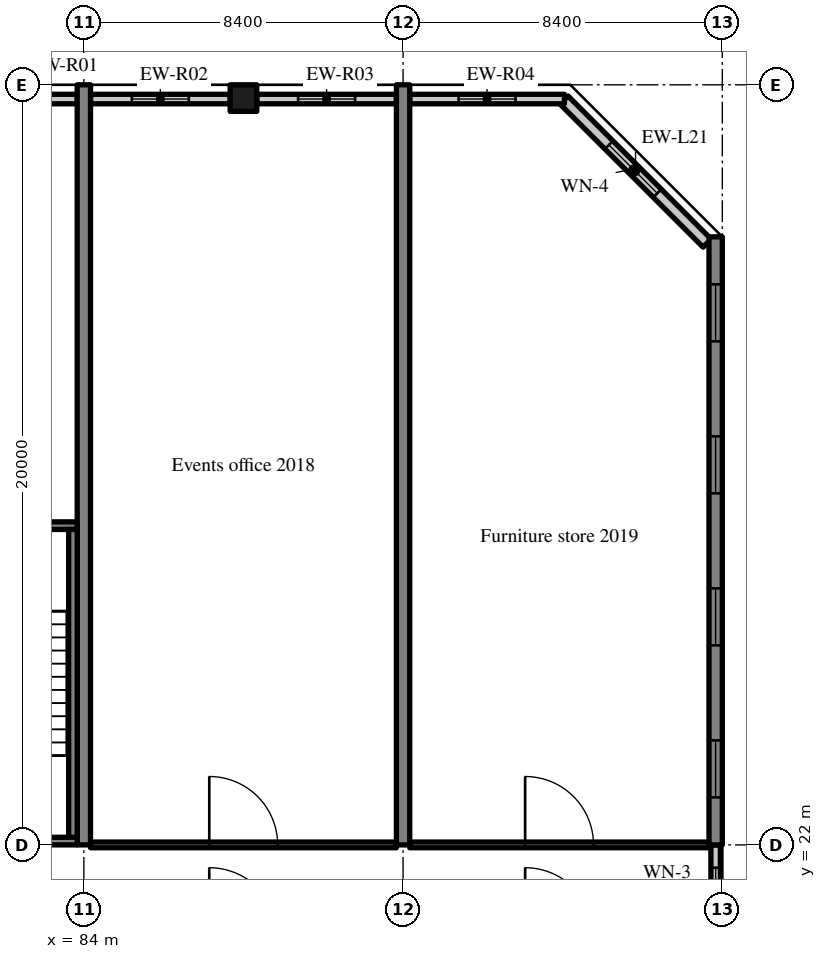
"""IFC4 building model, lengths in metres.
Left out: names, types, materials, properties, quantities, classifications, styles, units other than length and angle.
Written with IfcOpenShell. Run it as: python <this file> out.ifc"""

import sys

from ifc_helpers import new_model, si_unit, direction, frame, frame_2d, origin, origin_2d, place, context, subcontext, project, spatial, rectangle, extrude, source, transform, mapped, element, fill, save


model = new_model("IFC4")
c1 = context("Model", 3, precision=1e-05, world=origin(), true_north=direction((0.0, 1.0)))
c2 = subcontext(c1, "Body", "Model", "MODEL_VIEW")
j1 = project(units=[si_unit("LENGTHUNIT", "METRE"), si_unit("PLANEANGLEUNIT", "RADIAN")], contexts=[c1])
p1 = place(None, origin())
s1 = spatial("IfcSite", under=j1, at=p1, CompositionType="ELEMENT")
p2 = place(p1, origin())
s2 = spatial("IfcBuilding", under=s1, at=p2, CompositionType="ELEMENT")
p3 = place(p2, frame((0.0, 0.0, 86.4)))
s3 = spatial("IfcBuildingStorey", under=s2, at=p3, CompositionType="ELEMENT", Elevation=86.4)
m1 = source(origin(), c2, "Body", "SweptSolid", [
    extrude(rectangle(XDim=20.0, YDim=0.35, at=frame_2d((10.0, 0.0))), origin(), (0.0, 0.0, 1.0), 4.72),
])
for number, where, z_axis, x_axis in (
    (1, (84.0, 22.0, 0.0), (0.0, 0.0, 1.0), (0.0, 1.0, 0.0)),
    (2, (92.4, 22.0, 0.0), (0.0, 0.0, 1.0), (0.0, 1.0, 0.0)),
):
    element("IfcWall", number, at=place(p3, frame(where, z_axis=z_axis, x_axis=x_axis)), inside=s3, PredefinedType="SHEAR", context=c2, shape_type="MappedRepresentation", body=[
        mapped(m1, transform((0.0, 0.0, 0.0), scale=1.0)),
    ])
m2 = source(origin(), c2, "Body", "SweptSolid", [
    extrude(rectangle(XDim=16.0, YDim=0.35, at=frame_2d((8.0, 0.0))), origin(), (0.0, 0.0, 1.0), 4.72),
])
p4 = place(p3, frame((100.625, 22.0, 0.0), z_axis=(0.0, 0.0, 1.0), x_axis=(0.0, 1.0, 0.0)))
e3 = element("IfcWall", 3, at=p4, inside=s3, PredefinedType="SHEAR", context=c2, shape_type="MappedRepresentation", body=[
    mapped(m2, transform((0.0, 0.0, 0.0), scale=1.0)),
])
m3 = source(origin(), c2, "Body", "SweptSolid", [
    extrude(rectangle(XDim=1.5, YDim=1.5, at=frame_2d((0.75, 0.75))), frame((0.0, 0.185, 0.0), z_axis=(0.0, -1.0, 0.0), x_axis=(1.0, 0.0, 0.0)), (0.0, 0.0, 1.0), 0.37),
])
p5 = place(p4, frame((1.25, 0.0, 0.9)))
e4 = element("IfcOpeningElement", 4, at=p5, cuts=e3, PredefinedType="OPENING", context=c2, shape_type="MappedRepresentation", body=[
    mapped(m3, transform((0.0, 0.0, 0.0), scale=1.0)),
])
p6 = place(p4, frame((5.25, 0.0, 0.9)))
e5 = element("IfcOpeningElement", 5, at=p6, cuts=e3, PredefinedType="OPENING", context=c2, shape_type="MappedRepresentation", body=[
    mapped(m3, transform((0.0, 0.0, 0.0), scale=1.0)),
])
p7 = place(p4, frame((9.25, 0.0, 0.9)))
e6 = element("IfcOpeningElement", 6, at=p7, cuts=e3, PredefinedType="OPENING", context=c2, shape_type="MappedRepresentation", body=[
    mapped(m3, transform((0.0, 0.0, 0.0), scale=1.0)),
])
p8 = place(p4, frame((13.25, 0.0, 0.9)))
e7 = element("IfcOpeningElement", 7, at=p8, cuts=e3, PredefinedType="OPENING", context=c2, shape_type="MappedRepresentation", body=[
    mapped(m3, transform((0.0, 0.0, 0.0), scale=1.0)),
])
m4 = source(origin(), c2, "Body", "SweptSolid", [
    extrude(rectangle(XDim=0.7, YDim=0.7, at=origin_2d()), origin(), (0.0, 0.0, 1.0), 4.72),
])
p9 = place(p3, frame((88.2, 41.65, 0.0), z_axis=(0.0, 0.0, 1.0), x_axis=(1.0, 0.0, 0.0)))
e8 = element("IfcColumn", 8, at=p9, inside=s3, PredefinedType="COLUMN", context=c2, shape_type="MappedRepresentation", body=[
    mapped(m4, transform((0.0, 0.0, 0.0), scale=1.0)),
])
m5 = source(origin(), c2, "Body", "SweptSolid", [
    extrude(rectangle(XDim=5.326, YDim=0.3, at=frame_2d((2.663, 0.0))), origin(), (0.0, 0.0, 1.0), 4.72),
])
p10 = place(p3, frame((100.4, 37.834, 0.0), z_axis=(0.0, 0.0, 1.0), x_axis=(-0.707083859269, 0.707129702361, 0.0)))
e9 = element("IfcWall", 9, at=p10, inside=s3, PredefinedType="SOLIDWALL", context=c2, shape_type="MappedRepresentation", body=[
    mapped(m5, transform((0.0, 0.0, 0.0), scale=1.0)),
])
m6 = source(origin(), c2, "Body", "SweptSolid", [
    extrude(rectangle(XDim=1.8, YDim=1.5, at=frame_2d((0.9, 0.75))), frame((0.0, 0.16, 0.0), z_axis=(0.0, -1.0, 0.0), x_axis=(1.0, 0.0, 0.0)), (0.0, 0.0, 1.0), 0.32),
])
p11 = place(p10, frame((1.854, 0.0, 0.9)))
e10 = element("IfcOpeningElement", 10, at=p11, cuts=e9, PredefinedType="OPENING", context=c2, shape_type="MappedRepresentation", body=[
    mapped(m6, transform((0.0, 0.0, 0.0), scale=1.0)),
])
m7 = source(origin(), c2, "Body", "SweptSolid", [
    extrude(rectangle(XDim=1.683, YDim=0.25, at=frame_2d((0.841, 0.0))), origin(), (0.0, 0.0, 1.0), 4.02),
])
p12 = place(p3, frame((83.825, 41.625, 0.0), z_axis=(0.0, 0.0, 1.0), x_axis=(-1.0, 0.0, 0.0)))
e11 = element("IfcWall", 11, at=p12, inside=s3, PredefinedType="SOLIDWALL", context=c2, shape_type="MappedRepresentation", body=[
    mapped(m7, transform((0.0, 0.0, 0.0), scale=1.0)),
])
m8 = source(origin(), c2, "Body", "SweptSolid", [
    extrude(rectangle(XDim=3.675, YDim=0.25, at=frame_2d((1.837, 0.0))), origin(), (0.0, 0.0, 1.0), 4.02),
])
p13 = place(p3, frame((87.85, 41.625, 0.0), z_axis=(0.0, 0.0, 1.0), x_axis=(-1.0, 0.0, 0.0)))
e12 = element("IfcWall", 12, at=p13, inside=s3, PredefinedType="SOLIDWALL", context=c2, shape_type="MappedRepresentation", body=[
    mapped(m8, transform((0.0, 0.0, 0.0), scale=1.0)),
])
m9 = source(origin(), c2, "Body", "SweptSolid", [
    extrude(rectangle(XDim=1.5, YDim=1.5, at=frame_2d((0.75, 0.75))), frame((0.0, 0.135, 0.0), z_axis=(0.0, -1.0, 0.0), x_axis=(1.0, 0.0, 0.0)), (0.0, 0.0, 1.0), 0.27),
])
p14 = place(p13, frame((1.087, 0.0, 0.9)))
e13 = element("IfcOpeningElement", 13, at=p14, cuts=e12, PredefinedType="OPENING", context=c2, shape_type="MappedRepresentation", body=[
    mapped(m9, transform((0.0, 0.0, 0.0), scale=1.0)),
])
p15 = place(p3, frame((92.225, 41.625, 0.0), z_axis=(0.0, 0.0, 1.0), x_axis=(-1.0, 0.0, 0.0)))
e14 = element("IfcWall", 14, at=p15, inside=s3, PredefinedType="SOLIDWALL", context=c2, shape_type="MappedRepresentation", body=[
    mapped(m8, transform((0.0, 0.0, 0.0), scale=1.0)),
])
p16 = place(p15, frame((1.087, 0.0, 0.9)))
e15 = element("IfcOpeningElement", 15, at=p16, cuts=e14, PredefinedType="OPENING", context=c2, shape_type="MappedRepresentation", body=[
    mapped(m9, transform((0.0, 0.0, 0.0), scale=1.0)),
])
m10 = source(origin(), c2, "Body", "SweptSolid", [
    extrude(rectangle(XDim=4.07, YDim=0.25, at=frame_2d((2.035, 0.0))), origin(), (0.0, 0.0, 1.0), 4.02),
])
p17 = place(p3, frame((96.645, 41.625, 0.0), z_axis=(0.0, 0.0, 1.0), x_axis=(-1.0, 0.0, 0.0)))
e16 = element("IfcWall", 16, at=p17, inside=s3, PredefinedType="SOLIDWALL", context=c2, shape_type="MappedRepresentation", body=[
    mapped(m10, transform((0.0, 0.0, 0.0), scale=1.0)),
])
p18 = place(p17, frame((1.285, 0.0, 0.9)))
e17 = element("IfcOpeningElement", 17, at=p18, cuts=e16, PredefinedType="OPENING", context=c2, shape_type="MappedRepresentation", body=[
    mapped(m9, transform((0.0, 0.0, 0.0), scale=1.0)),
])
m11 = source(origin(), c2, "Body", "SweptSolid", [
    extrude(rectangle(XDim=2.4, YDim=0.25, at=frame_2d((1.2, 0.0))), origin(), (0.0, 0.0, 1.0), 3.82),
])
p19 = place(p3, frame((100.625, 19.6, 0.0), z_axis=(0.0, 0.0, 1.0), x_axis=(0.0, 1.0, 0.0)))
e18 = element("IfcWall", 18, at=p19, inside=s3, PredefinedType="SOLIDWALL", context=c2, shape_type="MappedRepresentation", body=[
    mapped(m11, transform((0.0, 0.0, 0.0), scale=1.0)),
])
m12 = source(origin(), c2, "Body", "SweptSolid", [
    extrude(rectangle(XDim=1.2, YDim=1.5, at=frame_2d((0.6, 0.75))), frame((0.0, 0.135, 0.0), z_axis=(0.0, -1.0, 0.0), x_axis=(1.0, 0.0, 0.0)), (0.0, 0.0, 1.0), 0.27),
])
p20 = place(p19, frame((0.6, 0.0, 0.9)))
e19 = element("IfcOpeningElement", 19, at=p20, cuts=e18, PredefinedType="OPENING", context=c2, shape_type="MappedRepresentation", body=[
    mapped(m12, transform((0.0, 0.0, 0.0), scale=1.0)),
])
m13 = source(origin(), c2, "Body", "SweptSolid", [
    extrude(rectangle(XDim=8.225, YDim=0.2, at=frame_2d((4.112, 0.0))), origin(), (0.0, 0.0, 1.0), 4.72),
])
p21 = place(p3, frame((83.825, 22.1, 0.0), z_axis=(0.0, 0.0, 1.0), x_axis=(-1.0, 0.0, 0.0)))
e20 = element("IfcWall", 20, at=p21, inside=s3, PredefinedType="SOLIDWALL", context=c2, shape_type="MappedRepresentation", body=[
    mapped(m13, transform((0.0, 0.0, 0.0), scale=1.0)),
])
m14 = source(origin(), c2, "Body", "SweptSolid", [
    extrude(rectangle(XDim=1.2, YDim=2.1, at=frame_2d((0.6, 1.05))), frame((0.0, 0.11, 0.0), z_axis=(0.0, -1.0, 0.0), x_axis=(1.0, 0.0, 0.0)), (0.0, 0.0, 1.0), 0.22),
])
p22 = place(p21, frame((6.025, 0.0, 0.0)))
e21 = element("IfcOpeningElement", 21, at=p22, cuts=e20, PredefinedType="OPENING", context=c2, shape_type="MappedRepresentation", body=[
    mapped(m14, transform((0.0, 0.0, 0.0), scale=1.0)),
])
p23 = place(p3, frame((83.825, 30.4, 0.0), z_axis=(0.0, 0.0, 1.0), x_axis=(-1.0, 0.0, 0.0)))
e22 = element("IfcWall", 22, at=p23, inside=s3, PredefinedType="SOLIDWALL", context=c2, shape_type="MappedRepresentation", body=[
    mapped(m13, transform((0.0, 0.0, 0.0), scale=1.0)),
])
m15 = source(origin(), c2, "Body", "SweptSolid", [
    extrude(rectangle(XDim=1.0, YDim=2.1, at=frame_2d((0.5, 1.05))), frame((0.0, 0.11, 0.0), z_axis=(0.0, -1.0, 0.0), x_axis=(1.0, 0.0, 0.0)), (0.0, 0.0, 1.0), 0.22),
])
p24 = place(p23, frame((6.125, 0.0, 0.0)))
e23 = element("IfcOpeningElement", 23, at=p24, cuts=e22, PredefinedType="OPENING", context=c2, shape_type="MappedRepresentation", body=[
    mapped(m15, transform((0.0, 0.0, 0.0), scale=1.0)),
])
m16 = source(origin(), c2, "Body", "SweptSolid", [
    extrude(rectangle(XDim=8.1, YDim=0.225, at=frame_2d((4.05, 0.0))), origin(), (0.0, 0.0, 1.0), 4.72),
])
p25 = place(p3, frame((83.713, 22.2, 0.0), z_axis=(0.0, 0.0, 1.0), x_axis=(0.0, 1.0, 0.0)))
e24 = element("IfcWall", 24, at=p25, inside=s3, PredefinedType="SOLIDWALL", context=c2, shape_type="MappedRepresentation", body=[
    mapped(m16, transform((0.0, 0.0, 0.0), scale=1.0)),
])
m17 = source(origin(), c2, "Body", "SweptSolid", [
    extrude(rectangle(XDim=8.05, YDim=0.15, at=frame_2d((4.025, 0.0))), origin(), (0.0, 0.0, 1.0), 4.02),
])
p26 = place(p3, frame((84.175, 22.0, 0.0), z_axis=(0.0, 0.0, 1.0), x_axis=(1.0, 0.0, 0.0)))
e25 = element("IfcWall", 25, at=p26, inside=s3, PredefinedType="PARTITIONING", context=c2, shape_type="MappedRepresentation", body=[
    mapped(m17, transform((0.0, 0.0, 0.0), scale=1.0)),
])
m18 = source(origin(), c2, "Body", "SweptSolid", [
    extrude(rectangle(XDim=1.8, YDim=2.1, at=frame_2d((0.9, 1.05))), frame((0.0, 0.085, 0.0), z_axis=(0.0, -1.0, 0.0), x_axis=(1.0, 0.0, 0.0)), (0.0, 0.0, 1.0), 0.17),
])
p27 = place(p26, frame((3.125, 0.0, 0.0)))
e26 = element("IfcOpeningElement", 26, at=p27, cuts=e25, PredefinedType="OPENING", context=c2, shape_type="MappedRepresentation", body=[
    mapped(m18, transform((0.0, 0.0, 0.0), scale=1.0)),
])
m19 = source(origin(), c2, "Body", "SweptSolid", [
    extrude(rectangle(XDim=7.875, YDim=0.15, at=frame_2d((3.938, 0.0))), origin(), (0.0, 0.0, 1.0), 4.02),
])
p28 = place(p3, frame((92.575, 22.0, 0.0), z_axis=(0.0, 0.0, 1.0), x_axis=(1.0, 0.0, 0.0)))
e27 = element("IfcWall", 27, at=p28, inside=s3, PredefinedType="PARTITIONING", context=c2, shape_type="MappedRepresentation", body=[
    mapped(m19, transform((0.0, 0.0, 0.0), scale=1.0)),
])
p29 = place(p28, frame((3.037, 0.0, 0.0)))
e28 = element("IfcOpeningElement", 28, at=p29, cuts=e27, PredefinedType="OPENING", context=c2, shape_type="MappedRepresentation", body=[
    mapped(m18, transform((0.0, 0.0, 0.0), scale=1.0)),
])
m20 = source(origin(), c2, "Body", "SweptSolid", [
    extrude(rectangle(XDim=1.8, YDim=1.5, at=frame_2d((0.9, 0.75))), frame((0.0, 0.03, 0.0), z_axis=(0.0, -1.0, 0.0), x_axis=(1.0, 0.0, 0.0)), (0.0, 0.0, 1.0), 0.06),
])
p30 = place(p11, origin())
e29 = element("IfcWindow", 29, at=p30, inside=s3, PartitioningType="SINGLE_PANEL", PredefinedType="WINDOW", context=c2, shape_type="MappedRepresentation", body=[
    mapped(m20, transform((0.0, 0.0, 0.0), scale=1.0)),
])
fill(e10, e29)
m21 = source(origin(), c2, "Body", "SweptSolid", [
    extrude(rectangle(XDim=1.5, YDim=1.5, at=frame_2d((0.75, 0.75))), frame((0.0, 0.03, 0.0), z_axis=(0.0, -1.0, 0.0), x_axis=(1.0, 0.0, 0.0)), (0.0, 0.0, 1.0), 0.06),
])
p31 = place(p14, origin())
e30 = element("IfcWindow", 30, at=p31, inside=s3, PartitioningType="SINGLE_PANEL", PredefinedType="WINDOW", context=c2, shape_type="MappedRepresentation", body=[
    mapped(m21, transform((0.0, 0.0, 0.0), scale=1.0)),
])
fill(e13, e30)
p32 = place(p16, origin())
e31 = element("IfcWindow", 31, at=p32, inside=s3, PartitioningType="SINGLE_PANEL", PredefinedType="WINDOW", context=c2, shape_type="MappedRepresentation", body=[
    mapped(m21, transform((0.0, 0.0, 0.0), scale=1.0)),
])
fill(e15, e31)
p33 = place(p18, origin())
e32 = element("IfcWindow", 32, at=p33, inside=s3, PartitioningType="SINGLE_PANEL", PredefinedType="WINDOW", context=c2, shape_type="MappedRepresentation", body=[
    mapped(m21, transform((0.0, 0.0, 0.0), scale=1.0)),
])
fill(e17, e32)
p34 = place(p5, origin())
e33 = element("IfcWindow", 33, at=p34, inside=s3, PartitioningType="SINGLE_PANEL", PredefinedType="WINDOW", context=c2, shape_type="MappedRepresentation", body=[
    mapped(m21, transform((0.0, 0.0, 0.0), scale=1.0)),
])
fill(e4, e33)
p35 = place(p6, origin())
e34 = element("IfcWindow", 34, at=p35, inside=s3, PartitioningType="SINGLE_PANEL", PredefinedType="WINDOW", context=c2, shape_type="MappedRepresentation", body=[
    mapped(m21, transform((0.0, 0.0, 0.0), scale=1.0)),
])
fill(e5, e34)
p36 = place(p7, origin())
e35 = element("IfcWindow", 35, at=p36, inside=s3, PartitioningType="SINGLE_PANEL", PredefinedType="WINDOW", context=c2, shape_type="MappedRepresentation", body=[
    mapped(m21, transform((0.0, 0.0, 0.0), scale=1.0)),
])
fill(e6, e35)
p37 = place(p8, origin())
e36 = element("IfcWindow", 36, at=p37, inside=s3, PartitioningType="SINGLE_PANEL", PredefinedType="WINDOW", context=c2, shape_type="MappedRepresentation", body=[
    mapped(m21, transform((0.0, 0.0, 0.0), scale=1.0)),
])
fill(e7, e36)
m22 = source(origin(), c2, "Body", "SweptSolid", [
    extrude(rectangle(XDim=1.2, YDim=1.5, at=frame_2d((0.6, 0.75))), frame((0.0, 0.03, 0.0), z_axis=(0.0, -1.0, 0.0), x_axis=(1.0, 0.0, 0.0)), (0.0, 0.0, 1.0), 0.06),
])
p38 = place(p20, origin())
e37 = element("IfcWindow", 37, at=p38, inside=s3, PartitioningType="SINGLE_PANEL", PredefinedType="WINDOW", context=c2, shape_type="MappedRepresentation", body=[
    mapped(m22, transform((0.0, 0.0, 0.0), scale=1.0)),
])
fill(e19, e37)
m23 = source(origin(), c2, "Body", "SweptSolid", [
    extrude(rectangle(XDim=1.8, YDim=2.1, at=frame_2d((0.9, 1.05))), frame((0.0, 0.025, 0.0), z_axis=(0.0, -1.0, 0.0), x_axis=(1.0, 0.0, 0.0)), (0.0, 0.0, 1.0), 0.05),
])
p39 = place(p27, origin())
e38 = element("IfcDoor", 38, at=p39, inside=s3, OperationType="DOUBLE_DOOR_SINGLE_SWING", PredefinedType="DOOR", context=c2, shape_type="MappedRepresentation", body=[
    mapped(m23, transform((0.0, 0.0, 0.0), scale=1.0)),
])
fill(e26, e38)
p40 = place(p29, origin())
e39 = element("IfcDoor", 39, at=p40, inside=s3, OperationType="DOUBLE_DOOR_SINGLE_SWING", PredefinedType="DOOR", context=c2, shape_type="MappedRepresentation", body=[
    mapped(m23, transform((0.0, 0.0, 0.0), scale=1.0)),
])
fill(e28, e39)
save(model, sys.argv[1])
